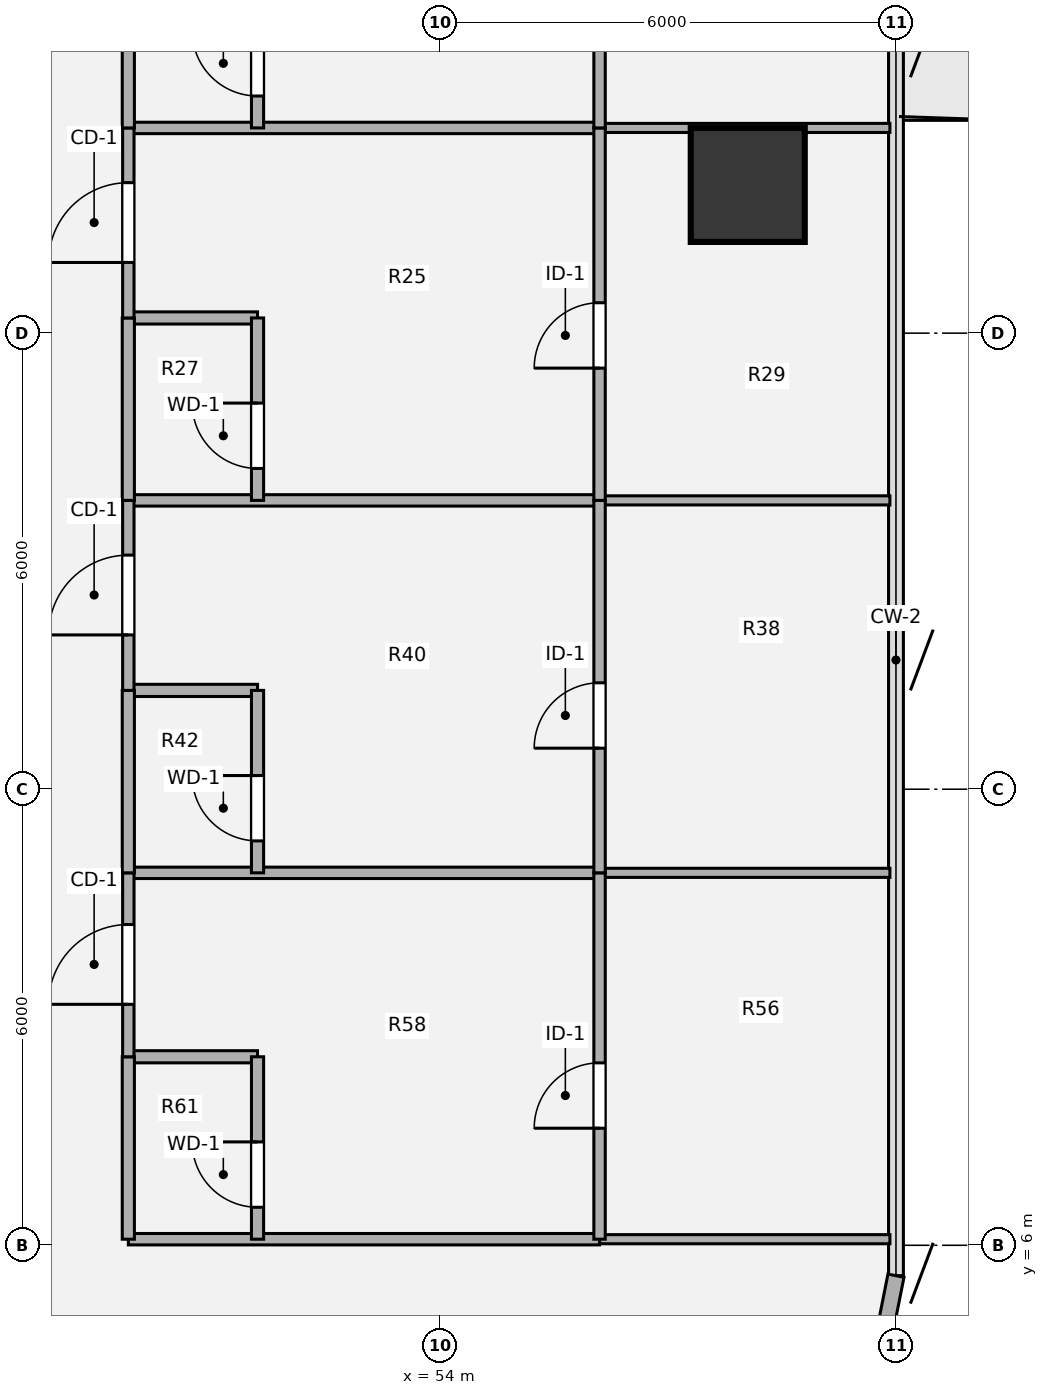
"""IFC4 building model, lengths in metres.
Left out: names, types, materials, properties, quantities, classifications, styles, units other than length and angle.
Written with IfcOpenShell. Run it as: python <this file> out.ifc"""

import sys

from ifc_helpers import new_model, si_unit, direction, frame, frame_2d, origin, origin_2d, place, context, subcontext, project, spatial, rectangle, hollow_circle, extrude, source, transform, mapped, element, fill, save


model = new_model("IFC4")
c1 = context("Model", 3, precision=1e-05, world=origin(), true_north=direction((0.0, 1.0)))
c2 = subcontext(c1, "Body", "Model", "MODEL_VIEW")
j1 = project(units=[si_unit("LENGTHUNIT", "METRE"), si_unit("PLANEANGLEUNIT", "RADIAN")], contexts=[c1])
p1 = place(None, origin())
s1 = spatial("IfcSite", under=j1, at=p1, CompositionType="ELEMENT")
p2 = place(p1, origin())
s2 = spatial("IfcBuilding", under=s1, at=p2, CompositionType="ELEMENT")
p3 = place(p2, frame((0.0, 0.0, 68.58)))
s3 = spatial("IfcBuildingStorey", under=s2, at=p3, CompositionType="ELEMENT", Elevation=68.58)
m1 = source(origin(), c2, "Body", "SweptSolid", [
    extrude(hollow_circle(Radius=0.75, WallThickness=0.05, at=origin_2d()), origin(), (0.0, 0.0, 1.0), 3.78),
])
p4 = place(p3, frame((58.05, 19.95, 0.0), z_axis=(0.0, 0.0, 1.0), x_axis=(1.0, 0.0, 0.0)))
e1 = element("IfcColumn", 1, at=p4, inside=s3, PredefinedType="COLUMN", context=c2, shape_type="MappedRepresentation", body=[
    mapped(m1, transform((0.0, 0.0, 0.0), x_axis=(1.0, 0.0, 0.0), y_axis=(0.0, 1.0, 0.0), z_axis=(0.0, 0.0, 1.0), scale=1.0)),
])
p5 = place(p3, frame((60.0, 5.6, 0.0), z_axis=(0.0, 0.0, 1.0), x_axis=(-0.195138390419, -0.980775717779, 0.0)))
e2 = element("IfcWall", 2, at=p5, inside=s3, PredefinedType="SOLIDWALL", context=c2, shape_type="SweptSolid", body=[
    extrude(rectangle(XDim=1.249, YDim=0.215, at=frame_2d((0.624, 0.0))), origin(), (0.0, 0.0, 1.0), 3.53),
])
p6 = place(p3, frame((49.9, 6.08, 0.0), z_axis=(0.0, 0.0, 1.0), x_axis=(1.0, 0.0, 0.0)))
e3 = element("IfcWall", 3, at=p6, inside=s3, PredefinedType="PARTITIONING", context=c2, shape_type="SweptSolid", body=[
    extrude(rectangle(XDim=6.2, YDim=0.15, at=frame_2d((3.1, 0.0))), origin(), (0.0, 0.0, 1.0), 3.5),
])
p7 = place(p3, frame((56.1, 6.08, 0.0), z_axis=(0.0, 0.0, 1.0), x_axis=(1.0, 0.0, 0.0)))
e4 = element("IfcWall", 4, at=p7, inside=s3, PredefinedType="PARTITIONING", context=c2, shape_type="SweptSolid", body=[
    extrude(rectangle(XDim=3.82, YDim=0.12, at=frame_2d((1.91, 0.0))), origin(), (0.0, 0.0, 1.0), 3.5),
])
p8 = place(p3, frame((49.9, 8.48, 0.0), z_axis=(0.0, 0.0, 1.0), x_axis=(1.0, 0.0, 0.0)))
e5 = element("IfcWall", 5, at=p8, inside=s3, PredefinedType="PLUMBINGWALL", context=c2, shape_type="SweptSolid", body=[
    extrude(rectangle(XDim=1.7, YDim=0.16, at=frame_2d((0.85, 0.0))), origin(), (0.0, 0.0, 1.0), 3.5),
])
p9 = place(p3, frame((49.9, 10.9, 0.0), z_axis=(0.0, 0.0, 1.0), x_axis=(1.0, 0.0, 0.0)))
e6 = element("IfcWall", 6, at=p9, inside=s3, PredefinedType="PARTITIONING", context=c2, shape_type="SweptSolid", body=[
    extrude(rectangle(XDim=6.2, YDim=0.15, at=frame_2d((3.1, 0.0))), origin(), (0.0, 0.0, 1.0), 3.5),
])
p10 = place(p3, frame((56.1, 10.9, 0.0), z_axis=(0.0, 0.0, 1.0), x_axis=(1.0, 0.0, 0.0)))
e7 = element("IfcWall", 7, at=p10, inside=s3, PredefinedType="PARTITIONING", context=c2, shape_type="SweptSolid", body=[
    extrude(rectangle(XDim=3.82, YDim=0.12, at=frame_2d((1.91, 0.0))), origin(), (0.0, 0.0, 1.0), 3.5),
])
p11 = place(p3, frame((49.9, 13.3, 0.0), z_axis=(0.0, 0.0, 1.0), x_axis=(1.0, 0.0, 0.0)))
e8 = element("IfcWall", 8, at=p11, inside=s3, PredefinedType="PLUMBINGWALL", context=c2, shape_type="SweptSolid", body=[
    extrude(rectangle(XDim=1.7, YDim=0.16, at=frame_2d((0.85, 0.0))), origin(), (0.0, 0.0, 1.0), 3.5),
])
p12 = place(p3, frame((49.9, 15.8, 0.0), z_axis=(0.0, 0.0, 1.0), x_axis=(1.0, 0.0, 0.0)))
e9 = element("IfcWall", 9, at=p12, inside=s3, PredefinedType="PARTITIONING", context=c2, shape_type="SweptSolid", body=[
    extrude(rectangle(XDim=6.2, YDim=0.15, at=frame_2d((3.1, 0.0))), origin(), (0.0, 0.0, 1.0), 3.5),
])
p13 = place(p3, frame((56.1, 15.8, 0.0), z_axis=(0.0, 0.0, 1.0), x_axis=(1.0, 0.0, 0.0)))
e10 = element("IfcWall", 10, at=p13, inside=s3, PredefinedType="PARTITIONING", context=c2, shape_type="SweptSolid", body=[
    extrude(rectangle(XDim=3.82, YDim=0.12, at=frame_2d((1.91, 0.0))), origin(), (0.0, 0.0, 1.0), 3.5),
])
p14 = place(p3, frame((49.9, 18.2, 0.0), z_axis=(0.0, 0.0, 1.0), x_axis=(1.0, 0.0, 0.0)))
e11 = element("IfcWall", 11, at=p14, inside=s3, PredefinedType="PLUMBINGWALL", context=c2, shape_type="SweptSolid", body=[
    extrude(rectangle(XDim=1.7, YDim=0.16, at=frame_2d((0.85, 0.0))), origin(), (0.0, 0.0, 1.0), 2.715),
])
p15 = place(p3, frame((49.9, 20.7, 0.0), z_axis=(0.0, 0.0, 1.0), x_axis=(1.0, 0.0, 0.0)))
e12 = element("IfcWall", 12, at=p15, inside=s3, PredefinedType="PARTITIONING", context=c2, shape_type="SweptSolid", body=[
    extrude(rectangle(XDim=6.2, YDim=0.15, at=frame_2d((3.1, 0.0))), origin(), (0.0, 0.0, 1.0), 2.982),
])
p16 = place(p3, frame((56.1, 20.7, 0.0), z_axis=(0.0, 0.0, 1.0), x_axis=(1.0, 0.0, 0.0)))
e13 = element("IfcWall", 13, at=p16, inside=s3, PredefinedType="PARTITIONING", context=c2, shape_type="SweptSolid", body=[
    extrude(rectangle(XDim=3.82, YDim=0.12, at=frame_2d((1.91, 0.0))), origin(), (0.0, 0.0, 1.0), 2.982),
])
p17 = place(p3, frame((49.9, 6.08, 0.0), z_axis=(0.0, 0.0, 1.0), x_axis=(0.0, 1.0, 0.0)))
e14 = element("IfcWall", 14, at=p17, inside=s3, PredefinedType="PLUMBINGWALL", context=c2, shape_type="SweptSolid", body=[
    extrude(rectangle(XDim=2.4, YDim=0.16, at=frame_2d((1.2, 0.0))), origin(), (0.0, 0.0, 1.0), 3.5),
])
p18 = place(p3, frame((49.9, 8.48, 0.0), z_axis=(0.0, 0.0, 1.0), x_axis=(0.0, 1.0, 0.0)))
e15 = element("IfcWall", 15, at=p18, inside=s3, PredefinedType="PARTITIONING", context=c2, shape_type="SweptSolid", body=[
    extrude(rectangle(XDim=2.42, YDim=0.15, at=frame_2d((1.21, 0.0))), origin(), (0.0, 0.0, 1.0), 3.5),
])
p19 = place(p18, frame((0.69, 0.0, 0.0)))
e16 = element("IfcOpeningElement", 16, at=p19, cuts=e15, PredefinedType="OPENING", context=c2, shape_type="SweptSolid", body=[
    extrude(rectangle(XDim=1.05, YDim=2.1, at=origin_2d()), frame((0.525, 0.085, 1.05), z_axis=(0.0, -1.0, 0.0), x_axis=(1.0, 0.0, 0.0)), (0.0, 0.0, 1.0), 0.17),
])
p20 = place(p3, frame((49.9, 10.9, 0.0), z_axis=(0.0, 0.0, 1.0), x_axis=(0.0, 1.0, 0.0)))
e17 = element("IfcWall", 17, at=p20, inside=s3, PredefinedType="PLUMBINGWALL", context=c2, shape_type="SweptSolid", body=[
    extrude(rectangle(XDim=2.4, YDim=0.16, at=frame_2d((1.2, 0.0))), origin(), (0.0, 0.0, 1.0), 3.5),
])
p21 = place(p3, frame((49.9, 13.3, 0.0), z_axis=(0.0, 0.0, 1.0), x_axis=(0.0, 1.0, 0.0)))
e18 = element("IfcWall", 18, at=p21, inside=s3, PredefinedType="PARTITIONING", context=c2, shape_type="SweptSolid", body=[
    extrude(rectangle(XDim=2.5, YDim=0.15, at=frame_2d((1.25, 0.0))), origin(), (0.0, 0.0, 1.0), 3.5),
])
p22 = place(p21, frame((0.73, 0.0, 0.0)))
e19 = element("IfcOpeningElement", 19, at=p22, cuts=e18, PredefinedType="OPENING", context=c2, shape_type="SweptSolid", body=[
    extrude(rectangle(XDim=1.05, YDim=2.1, at=origin_2d()), frame((0.525, 0.085, 1.05), z_axis=(0.0, -1.0, 0.0), x_axis=(1.0, 0.0, 0.0)), (0.0, 0.0, 1.0), 0.17),
])
p23 = place(p3, frame((49.9, 15.8, 0.0), z_axis=(0.0, 0.0, 1.0), x_axis=(0.0, 1.0, 0.0)))
e20 = element("IfcWall", 20, at=p23, inside=s3, PredefinedType="PLUMBINGWALL", context=c2, shape_type="SweptSolid", body=[
    extrude(rectangle(XDim=2.4, YDim=0.16, at=frame_2d((1.2, 0.0))), origin(), (0.0, 0.0, 1.0), 3.5),
])
p24 = place(p3, frame((49.9, 18.2, 0.0), z_axis=(0.0, 0.0, 1.0), x_axis=(0.0, 1.0, 0.0)))
e21 = element("IfcWall", 21, at=p24, inside=s3, PredefinedType="PARTITIONING", context=c2, shape_type="SweptSolid", body=[
    extrude(rectangle(XDim=2.5, YDim=0.15, at=frame_2d((1.25, 0.0))), origin(), (0.0, 0.0, 1.0), 3.5),
])
p25 = place(p24, frame((0.73, 0.0, 0.0)))
e22 = element("IfcOpeningElement", 22, at=p25, cuts=e21, PredefinedType="OPENING", context=c2, shape_type="SweptSolid", body=[
    extrude(rectangle(XDim=1.05, YDim=2.1, at=origin_2d()), frame((0.525, 0.085, 1.05), z_axis=(0.0, -1.0, 0.0), x_axis=(1.0, 0.0, 0.0)), (0.0, 0.0, 1.0), 0.17),
])
p26 = place(p3, frame((49.9, 20.7, 0.0), z_axis=(0.0, 0.0, 1.0), x_axis=(0.0, 1.0, 0.0)))
e23 = element("IfcWall", 23, at=p26, inside=s3, PredefinedType="PLUMBINGWALL", context=c2, shape_type="SweptSolid", body=[
    extrude(rectangle(XDim=2.4, YDim=0.16, at=frame_2d((1.2, 0.0))), origin(), (0.0, 0.0, 1.0), 3.5),
])
p27 = place(p3, frame((51.6, 6.08, 0.0), z_axis=(0.0, 0.0, 1.0), x_axis=(0.0, 1.0, 0.0)))
e24 = element("IfcWall", 24, at=p27, inside=s3, PredefinedType="PLUMBINGWALL", context=c2, shape_type="SweptSolid", body=[
    extrude(rectangle(XDim=2.4, YDim=0.16, at=frame_2d((1.2, 0.0))), origin(), (0.0, 0.0, 1.0), 3.5),
])
p28 = place(p27, frame((0.42, 0.0, 0.0)))
e25 = element("IfcOpeningElement", 25, at=p28, cuts=e24, PredefinedType="OPENING", context=c2, shape_type="SweptSolid", body=[
    extrude(rectangle(XDim=0.86, YDim=2.1, at=origin_2d()), frame((0.43, 0.09, 1.05), z_axis=(0.0, -1.0, 0.0), x_axis=(1.0, 0.0, 0.0)), (0.0, 0.0, 1.0), 0.18),
])
p29 = place(p3, frame((51.6, 10.9, 0.0), z_axis=(0.0, 0.0, 1.0), x_axis=(0.0, 1.0, 0.0)))
e26 = element("IfcWall", 26, at=p29, inside=s3, PredefinedType="PLUMBINGWALL", context=c2, shape_type="SweptSolid", body=[
    extrude(rectangle(XDim=2.4, YDim=0.16, at=frame_2d((1.2, 0.0))), origin(), (0.0, 0.0, 1.0), 3.5),
])
p30 = place(p29, frame((0.42, 0.0, 0.0)))
e27 = element("IfcOpeningElement", 27, at=p30, cuts=e26, PredefinedType="OPENING", context=c2, shape_type="SweptSolid", body=[
    extrude(rectangle(XDim=0.86, YDim=2.1, at=origin_2d()), frame((0.43, 0.09, 1.05), z_axis=(0.0, -1.0, 0.0), x_axis=(1.0, 0.0, 0.0)), (0.0, 0.0, 1.0), 0.18),
])
p31 = place(p3, frame((51.6, 15.8, 0.0), z_axis=(0.0, 0.0, 1.0), x_axis=(0.0, 1.0, 0.0)))
e28 = element("IfcWall", 28, at=p31, inside=s3, PredefinedType="PLUMBINGWALL", context=c2, shape_type="SweptSolid", body=[
    extrude(rectangle(XDim=2.4, YDim=0.16, at=frame_2d((1.2, 0.0))), origin(), (0.0, 0.0, 1.0), 3.5),
])
p32 = place(p31, frame((0.42, 0.0, 0.0)))
e29 = element("IfcOpeningElement", 29, at=p32, cuts=e28, PredefinedType="OPENING", context=c2, shape_type="SweptSolid", body=[
    extrude(rectangle(XDim=0.86, YDim=2.1, at=origin_2d()), frame((0.43, 0.09, 1.05), z_axis=(0.0, -1.0, 0.0), x_axis=(1.0, 0.0, 0.0)), (0.0, 0.0, 1.0), 0.18),
])
p33 = place(p3, frame((51.6, 20.7, 0.0), z_axis=(0.0, 0.0, 1.0), x_axis=(0.0, 1.0, 0.0)))
e30 = element("IfcWall", 30, at=p33, inside=s3, PredefinedType="PLUMBINGWALL", context=c2, shape_type="SweptSolid", body=[
    extrude(rectangle(XDim=2.4, YDim=0.16, at=frame_2d((1.2, 0.0))), origin(), (0.0, 0.0, 1.0), 3.5),
])
p34 = place(p33, frame((0.42, 0.0, 0.0)))
e31 = element("IfcOpeningElement", 31, at=p34, cuts=e30, PredefinedType="OPENING", context=c2, shape_type="SweptSolid", body=[
    extrude(rectangle(XDim=0.86, YDim=2.1, at=origin_2d()), frame((0.43, 0.09, 1.05), z_axis=(0.0, -1.0, 0.0), x_axis=(1.0, 0.0, 0.0)), (0.0, 0.0, 1.0), 0.18),
])
p35 = place(p3, frame((56.1, 6.08, 0.0), z_axis=(0.0, 0.0, 1.0), x_axis=(0.0, 1.0, 0.0)))
e32 = element("IfcWall", 32, at=p35, inside=s3, PredefinedType="PARTITIONING", context=c2, shape_type="SweptSolid", body=[
    extrude(rectangle(XDim=4.82, YDim=0.15, at=frame_2d((2.41, 0.0))), origin(), (0.0, 0.0, 1.0), 3.5),
])
p36 = place(p35, frame((1.46, 0.0, 0.0)))
e33 = element("IfcOpeningElement", 33, at=p36, cuts=e32, PredefinedType="OPENING", context=c2, shape_type="SweptSolid", body=[
    extrude(rectangle(XDim=0.86, YDim=2.1, at=origin_2d()), frame((0.43, 0.085, 1.05), z_axis=(0.0, -1.0, 0.0), x_axis=(1.0, 0.0, 0.0)), (0.0, 0.0, 1.0), 0.17),
])
p37 = place(p3, frame((56.1, 10.9, 0.0), z_axis=(0.0, 0.0, 1.0), x_axis=(0.0, 1.0, 0.0)))
e34 = element("IfcWall", 34, at=p37, inside=s3, PredefinedType="PARTITIONING", context=c2, shape_type="SweptSolid", body=[
    extrude(rectangle(XDim=4.9, YDim=0.15, at=frame_2d((2.45, 0.0))), origin(), (0.0, 0.0, 1.0), 3.5),
])
p38 = place(p37, frame((1.64, 0.0, 0.0)))
e35 = element("IfcOpeningElement", 35, at=p38, cuts=e34, PredefinedType="OPENING", context=c2, shape_type="SweptSolid", body=[
    extrude(rectangle(XDim=0.86, YDim=2.1, at=origin_2d()), frame((0.43, 0.085, 1.05), z_axis=(0.0, -1.0, 0.0), x_axis=(1.0, 0.0, 0.0)), (0.0, 0.0, 1.0), 0.17),
])
p39 = place(p3, frame((56.1, 15.8, 0.0), z_axis=(0.0, 0.0, 1.0), x_axis=(0.0, 1.0, 0.0)))
e36 = element("IfcWall", 36, at=p39, inside=s3, PredefinedType="PARTITIONING", context=c2, shape_type="SweptSolid", body=[
    extrude(rectangle(XDim=4.9, YDim=0.15, at=frame_2d((2.45, 0.0))), origin(), (0.0, 0.0, 1.0), 3.5),
])
p40 = place(p39, frame((1.74, 0.0, 0.0)))
e37 = element("IfcOpeningElement", 37, at=p40, cuts=e36, PredefinedType="OPENING", context=c2, shape_type="SweptSolid", body=[
    extrude(rectangle(XDim=0.86, YDim=2.1, at=origin_2d()), frame((0.43, 0.085, 1.05), z_axis=(0.0, -1.0, 0.0), x_axis=(1.0, 0.0, 0.0)), (0.0, 0.0, 1.0), 0.17),
])
p41 = place(p3, frame((56.1, 20.7, 0.0), z_axis=(0.0, 0.0, 1.0), x_axis=(0.0, 1.0, 0.0)))
e38 = element("IfcWall", 38, at=p41, inside=s3, PredefinedType="PARTITIONING", context=c2, shape_type="SweptSolid", body=[
    extrude(rectangle(XDim=4.9, YDim=0.15, at=frame_2d((2.45, 0.0))), origin(), (0.0, 0.0, 1.0), 3.5),
])
p42 = place(p41, frame((1.84, 0.0, 0.0)))
e39 = element("IfcOpeningElement", 39, at=p42, cuts=e38, PredefinedType="OPENING", context=c2, shape_type="SweptSolid", body=[
    extrude(rectangle(XDim=0.86, YDim=2.1, at=origin_2d()), frame((0.43, 0.085, 1.05), z_axis=(0.0, -1.0, 0.0), x_axis=(1.0, 0.0, 0.0)), (0.0, 0.0, 1.0), 0.17),
])
m2 = source(origin(), c2, "Body", "SweptSolid", [
    extrude(rectangle(XDim=1.05, YDim=2.1, at=origin_2d()), frame((0.525, 0.025, 1.05), z_axis=(0.0, -1.0, 0.0), x_axis=(1.0, 0.0, 0.0)), (0.0, 0.0, 1.0), 0.05),
])
p43 = place(p19, origin())
e40 = element("IfcDoor", 40, at=p43, inside=s3, OperationType="SINGLE_SWING_LEFT", PredefinedType="DOOR", context=c2, shape_type="MappedRepresentation", body=[
    mapped(m2, transform((0.0, 0.0, 0.0), x_axis=(1.0, 0.0, 0.0), y_axis=(0.0, 1.0, 0.0), z_axis=(0.0, 0.0, 1.0), scale=1.0)),
])
fill(e16, e40)
p44 = place(p22, origin())
e41 = element("IfcDoor", 41, at=p44, inside=s3, OperationType="SINGLE_SWING_LEFT", PredefinedType="DOOR", context=c2, shape_type="MappedRepresentation", body=[
    mapped(m2, transform((0.0, 0.0, 0.0), x_axis=(1.0, 0.0, 0.0), y_axis=(0.0, 1.0, 0.0), z_axis=(0.0, 0.0, 1.0), scale=1.0)),
])
fill(e19, e41)
p45 = place(p25, origin())
e42 = element("IfcDoor", 42, at=p45, inside=s3, OperationType="SINGLE_SWING_LEFT", PredefinedType="DOOR", context=c2, shape_type="MappedRepresentation", body=[
    mapped(m2, transform((0.0, 0.0, 0.0), x_axis=(1.0, 0.0, 0.0), y_axis=(0.0, 1.0, 0.0), z_axis=(0.0, 0.0, 1.0), scale=1.0)),
])
fill(e22, e42)
m3 = source(origin(), c2, "Body", "SweptSolid", [
    extrude(rectangle(XDim=0.86, YDim=2.1, at=origin_2d()), frame((0.43, 0.025, 1.05), z_axis=(0.0, -1.0, 0.0), x_axis=(1.0, 0.0, 0.0)), (0.0, 0.0, 1.0), 0.05),
])
p46 = place(p28, origin())
e43 = element("IfcDoor", 43, at=p46, inside=s3, OperationType="SINGLE_SWING_RIGHT", PredefinedType="DOOR", context=c2, shape_type="MappedRepresentation", body=[
    mapped(m3, transform((0.0, 0.0, 0.0), x_axis=(1.0, 0.0, 0.0), y_axis=(0.0, 1.0, 0.0), z_axis=(0.0, 0.0, 1.0), scale=1.0)),
])
fill(e25, e43)
p47 = place(p30, origin())
e44 = element("IfcDoor", 44, at=p47, inside=s3, OperationType="SINGLE_SWING_RIGHT", PredefinedType="DOOR", context=c2, shape_type="MappedRepresentation", body=[
    mapped(m3, transform((0.0, 0.0, 0.0), x_axis=(1.0, 0.0, 0.0), y_axis=(0.0, 1.0, 0.0), z_axis=(0.0, 0.0, 1.0), scale=1.0)),
])
fill(e27, e44)
p48 = place(p32, origin())
e45 = element("IfcDoor", 45, at=p48, inside=s3, OperationType="SINGLE_SWING_RIGHT", PredefinedType="DOOR", context=c2, shape_type="MappedRepresentation", body=[
    mapped(m3, transform((0.0, 0.0, 0.0), x_axis=(1.0, 0.0, 0.0), y_axis=(0.0, 1.0, 0.0), z_axis=(0.0, 0.0, 1.0), scale=1.0)),
])
fill(e29, e45)
p49 = place(p34, origin())
e46 = element("IfcDoor", 46, at=p49, inside=s3, OperationType="SINGLE_SWING_RIGHT", PredefinedType="DOOR", context=c2, shape_type="MappedRepresentation", body=[
    mapped(m3, transform((0.0, 0.0, 0.0), x_axis=(1.0, 0.0, 0.0), y_axis=(0.0, 1.0, 0.0), z_axis=(0.0, 0.0, 1.0), scale=1.0)),
])
fill(e31, e46)
m4 = source(origin(), c2, "Body", "SweptSolid", [
    extrude(rectangle(XDim=0.86, YDim=2.1, at=origin_2d()), frame((0.43, 0.025, 1.05), z_axis=(0.0, -1.0, 0.0), x_axis=(1.0, 0.0, 0.0)), (0.0, 0.0, 1.0), 0.05),
])
p50 = place(p36, origin())
e47 = element("IfcDoor", 47, at=p50, inside=s3, OperationType="SINGLE_SWING_LEFT", PredefinedType="DOOR", context=c2, shape_type="MappedRepresentation", body=[
    mapped(m4, transform((0.0, 0.0, 0.0), x_axis=(1.0, 0.0, 0.0), y_axis=(0.0, 1.0, 0.0), z_axis=(0.0, 0.0, 1.0), scale=1.0)),
])
fill(e33, e47)
p51 = place(p38, origin())
e48 = element("IfcDoor", 48, at=p51, inside=s3, OperationType="SINGLE_SWING_LEFT", PredefinedType="DOOR", context=c2, shape_type="MappedRepresentation", body=[
    mapped(m4, transform((0.0, 0.0, 0.0), x_axis=(1.0, 0.0, 0.0), y_axis=(0.0, 1.0, 0.0), z_axis=(0.0, 0.0, 1.0), scale=1.0)),
])
fill(e35, e48)
p52 = place(p40, origin())
e49 = element("IfcDoor", 49, at=p52, inside=s3, OperationType="SINGLE_SWING_LEFT", PredefinedType="DOOR", context=c2, shape_type="MappedRepresentation", body=[
    mapped(m4, transform((0.0, 0.0, 0.0), x_axis=(1.0, 0.0, 0.0), y_axis=(0.0, 1.0, 0.0), z_axis=(0.0, 0.0, 1.0), scale=1.0)),
])
fill(e37, e49)
save(model, sys.argv[1])
